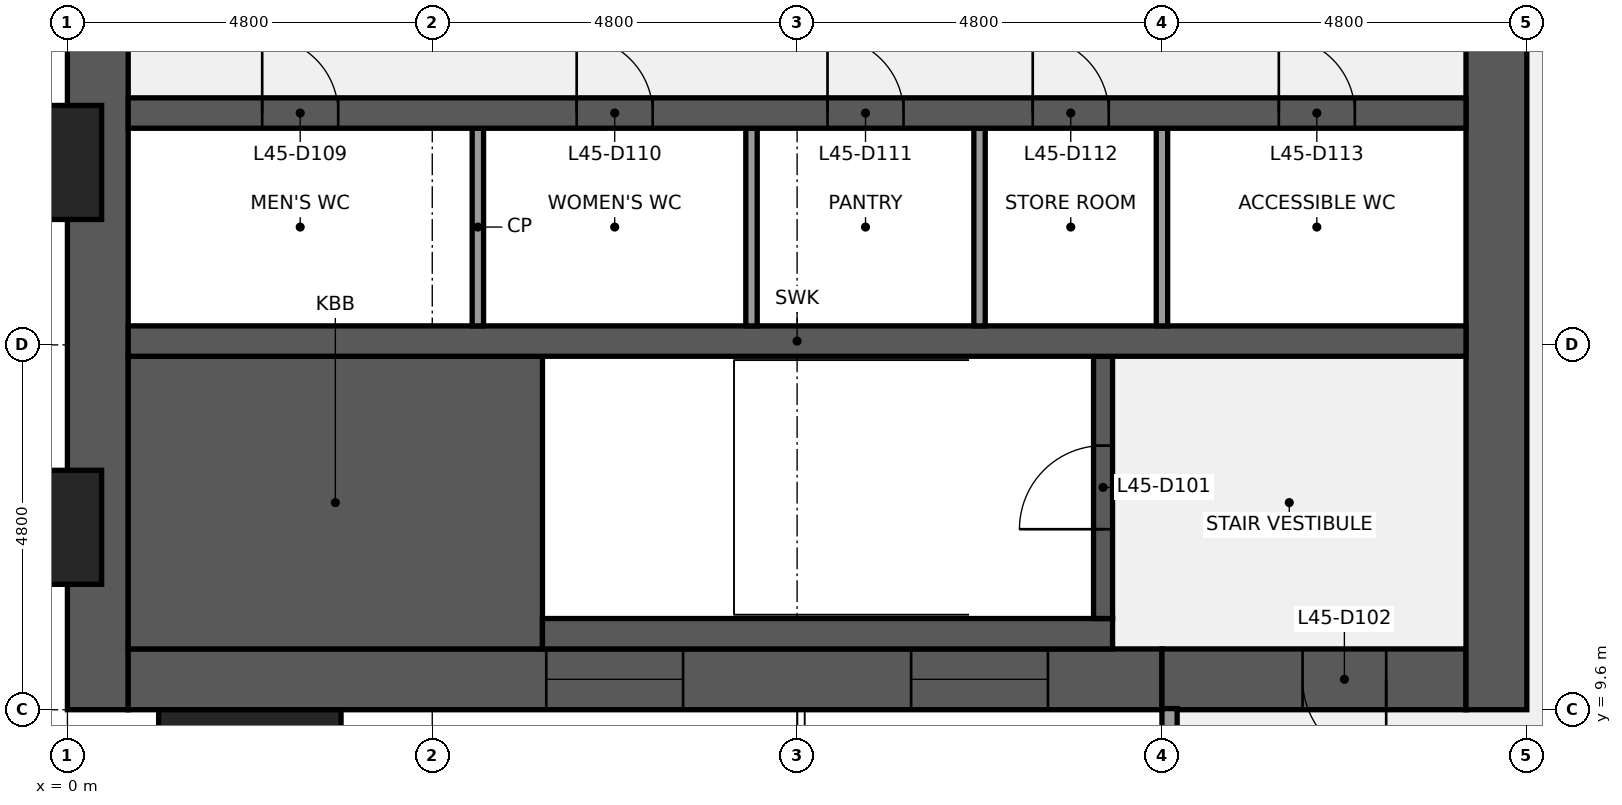
"""IFC4 building model, lengths in metres.
Left out: names, types, materials, properties, quantities, classifications, styles, units other than length and angle.
Written with IfcOpenShell. Run it as: python <this file> out.ifc"""

import sys

from ifc_helpers import new_model, si_unit, direction, frame, frame_2d, origin, origin_2d, place, context, subcontext, project, spatial, rectangle, extrude, element, fill, save


model = new_model("IFC4")
c1 = context("Model", 3, precision=1e-05, world=origin(), true_north=direction((0.0, 1.0)))
c2 = subcontext(c1, "Body", "Model", "MODEL_VIEW")
j1 = project(units=[si_unit("LENGTHUNIT", "METRE"), si_unit("PLANEANGLEUNIT", "RADIAN")], contexts=[c1])
p1 = place(None, origin())
s1 = spatial("IfcSite", under=j1, at=p1, CompositionType="ELEMENT")
p2 = place(p1, origin())
s2 = spatial("IfcBuilding", under=s1, at=p2, CompositionType="ELEMENT")
p3 = place(p2, frame((0.0, 0.0, 209.2)))
s3 = spatial("IfcBuildingStorey", under=s2, at=p3, CompositionType="ELEMENT", Elevation=209.2)
p4 = place(p3, frame((0.4, 9.6, 0.0), z_axis=(0.0, 0.0, 1.0), x_axis=(0.0, 1.0, 0.0)))
e1 = element("IfcWall", 1, at=p4, inside=s3, PredefinedType="SHEAR", context=c2, shape_type="SweptSolid", body=[
    extrude(rectangle(XDim=28.8, YDim=0.8, at=frame_2d((14.4, 0.0))), origin(), (0.0, 0.0, 1.0), 3.84),
])
p5 = place(p4, frame((8.85, 0.0, 0.9)))
e2 = element("IfcOpeningElement", 2, at=p5, cuts=e1, PredefinedType="OPENING", context=c2, shape_type="SweptSolid", body=[
    extrude(rectangle(XDim=1.5, YDim=1.5, at=frame_2d((0.75, 0.75))), frame((0.0, 0.41, 0.0), z_axis=(0.0, -1.0, 0.0), x_axis=(1.0, 0.0, 0.0)), (0.0, 0.0, 1.0), 0.82),
])
p6 = place(p4, frame((18.45, 0.0, 0.9)))
e3 = element("IfcOpeningElement", 3, at=p6, cuts=e1, PredefinedType="OPENING", context=c2, shape_type="SweptSolid", body=[
    extrude(rectangle(XDim=1.5, YDim=1.5, at=frame_2d((0.75, 0.75))), frame((0.0, 0.41, 0.0), z_axis=(0.0, -1.0, 0.0), x_axis=(1.0, 0.0, 0.0)), (0.0, 0.0, 1.0), 0.82),
])
p7 = place(p3, frame((14.4, 10.0, 0.0), z_axis=(0.0, 0.0, 1.0), x_axis=(-1.0, 0.0, 0.0)))
e4 = element("IfcWall", 4, at=p7, inside=s3, PredefinedType="SHEAR", context=c2, shape_type="SweptSolid", body=[
    extrude(rectangle(XDim=13.6, YDim=0.8, at=frame_2d((6.8, 0.0))), origin(), (0.0, 0.0, 1.0), 3.84),
])
p8 = place(p7, frame((6.3, 0.0, 0.9)))
e5 = element("IfcOpeningElement", 5, at=p8, cuts=e4, PredefinedType="OPENING", context=c2, shape_type="SweptSolid", body=[
    extrude(rectangle(XDim=1.8, YDim=1.5, at=frame_2d((0.9, 0.75))), frame((0.0, 0.41, 0.0), z_axis=(0.0, -1.0, 0.0), x_axis=(1.0, 0.0, 0.0)), (0.0, 0.0, 1.0), 0.82),
])
p9 = place(p7, frame((1.5, 0.0, 0.9)))
e6 = element("IfcOpeningElement", 6, at=p9, cuts=e4, PredefinedType="OPENING", context=c2, shape_type="SweptSolid", body=[
    extrude(rectangle(XDim=1.8, YDim=1.5, at=frame_2d((0.9, 0.75))), frame((0.0, 0.41, 0.0), z_axis=(0.0, -1.0, 0.0), x_axis=(1.0, 0.0, 0.0)), (0.0, 0.0, 1.0), 0.82),
])
p10 = place(p3, frame((18.4, 10.0, 0.0), z_axis=(0.0, 0.0, 1.0), x_axis=(-1.0, 0.0, 0.0)))
e7 = element("IfcWall", 7, at=p10, inside=s3, PredefinedType="SHEAR", context=c2, shape_type="SweptSolid", body=[
    extrude(rectangle(XDim=4.0, YDim=0.8, at=frame_2d((2.0, 0.0))), origin(), (0.0, 0.0, 1.0), 3.84),
])
p11 = place(p10, frame((1.05, 0.0, 0.0)))
e8 = element("IfcOpeningElement", 8, at=p11, cuts=e7, PredefinedType="OPENING", context=c2, shape_type="SweptSolid", body=[
    extrude(rectangle(XDim=1.1, YDim=2.1, at=frame_2d((0.55, 1.05))), frame((0.0, 0.41, 0.0), z_axis=(0.0, -1.0, 0.0), x_axis=(1.0, 0.0, 0.0)), (0.0, 0.0, 1.0), 0.82),
])
p12 = place(p3, frame((18.8, 38.4, 0.0), z_axis=(0.0, 0.0, 1.0), x_axis=(0.0, -1.0, 0.0)))
e9 = element("IfcWall", 9, at=p12, inside=s3, PredefinedType="SHEAR", context=c2, shape_type="SweptSolid", body=[
    extrude(rectangle(XDim=28.8, YDim=0.8, at=frame_2d((14.4, 0.0))), origin(), (0.0, 0.0, 1.0), 3.84),
])
p13 = place(p12, frame((18.3, 0.0, 0.0)))
e10 = element("IfcOpeningElement", 10, at=p13, cuts=e9, PredefinedType="OPENING", context=c2, shape_type="SweptSolid", body=[
    extrude(rectangle(XDim=1.8, YDim=2.1, at=frame_2d((0.9, 1.05))), frame((0.0, 0.41, 0.0), z_axis=(0.0, -1.0, 0.0), x_axis=(1.0, 0.0, 0.0)), (0.0, 0.0, 1.0), 0.82),
])
p14 = place(p12, frame((8.7, 0.0, 0.0)))
e11 = element("IfcOpeningElement", 11, at=p14, cuts=e9, PredefinedType="OPENING", context=c2, shape_type="SweptSolid", body=[
    extrude(rectangle(XDim=1.8, YDim=2.1, at=frame_2d((0.9, 1.05))), frame((0.0, 0.41, 0.0), z_axis=(0.0, -1.0, 0.0), x_axis=(1.0, 0.0, 0.0)), (0.0, 0.0, 1.0), 0.82),
])
p15 = place(p3, frame((0.8, 12.325, 0.0), z_axis=(0.0, 0.0, 1.0), x_axis=(1.0, 0.0, 0.0)))
e12 = element("IfcWall", 12, at=p15, inside=s3, PredefinedType="SHEAR", context=c2, shape_type="SweptSolid", body=[
    extrude(rectangle(XDim=5.45, YDim=3.85, at=frame_2d((2.725, 0.0))), origin(), (0.0, 0.0, 1.0), 3.84),
])
p16 = place(p3, frame((6.25, 10.6, 0.0), z_axis=(0.0, 0.0, 1.0), x_axis=(1.0, 0.0, 0.0)))
e13 = element("IfcWall", 13, at=p16, inside=s3, PredefinedType="SHEAR", context=c2, shape_type="SweptSolid", body=[
    extrude(rectangle(XDim=7.5, YDim=0.4, at=frame_2d((3.75, 0.0))), origin(), (0.0, 0.0, 1.0), 3.84),
])
p17 = place(p3, frame((13.625, 10.8, 0.0), z_axis=(0.0, 0.0, 1.0), x_axis=(0.0, 1.0, 0.0)))
e14 = element("IfcWall", 14, at=p17, inside=s3, PredefinedType="SHEAR", context=c2, shape_type="SweptSolid", body=[
    extrude(rectangle(XDim=3.45, YDim=0.25, at=frame_2d((1.725, 0.0))), origin(), (0.0, 0.0, 1.0), 3.84),
])
p18 = place(p17, frame((1.175, 0.0, 0.0)))
e15 = element("IfcOpeningElement", 15, at=p18, cuts=e14, PredefinedType="OPENING", context=c2, shape_type="SweptSolid", body=[
    extrude(rectangle(XDim=1.1, YDim=2.1, at=frame_2d((0.55, 1.05))), frame((0.0, 0.135, 0.0), z_axis=(0.0, -1.0, 0.0), x_axis=(1.0, 0.0, 0.0)), (0.0, 0.0, 1.0), 0.27),
])
p19 = place(p3, frame((0.8, 14.45, 0.0), z_axis=(0.0, 0.0, 1.0), x_axis=(1.0, 0.0, 0.0)))
e16 = element("IfcWall", 16, at=p19, inside=s3, PredefinedType="SHEAR", context=c2, shape_type="SweptSolid", body=[
    extrude(rectangle(XDim=17.6, YDim=0.4, at=frame_2d((8.8, 0.0))), origin(), (0.0, 0.0, 1.0), 3.84),
])
for number, where, z_axis, x_axis in (
    (17, (5.4, 14.65, 0.0), (0.0, 0.0, 1.0), (0.0, 1.0, 0.0)),
    (18, (9.0, 14.65, 0.0), (0.0, 0.0, 1.0), (0.0, 1.0, 0.0)),
    (19, (12.0, 14.65, 0.0), (0.0, 0.0, 1.0), (0.0, 1.0, 0.0)),
    (20, (14.4, 14.65, 0.0), (0.0, 0.0, 1.0), (0.0, 1.0, 0.0)),
):
    element("IfcWall", number, at=place(p3, frame(where, z_axis=z_axis, x_axis=x_axis)), inside=s3, PredefinedType="PARTITIONING", context=c2, shape_type="SweptSolid", body=[
        extrude(rectangle(XDim=2.6, YDim=0.15, at=frame_2d((1.3, 0.0))), origin(), (0.0, 0.0, 1.0), 3.84),
    ])
p20 = place(p3, frame((0.8, 17.45, 0.0), z_axis=(0.0, 0.0, 1.0), x_axis=(1.0, 0.0, 0.0)))
e21 = element("IfcWall", 21, at=p20, inside=s3, PredefinedType="SHEAR", context=c2, shape_type="SweptSolid", body=[
    extrude(rectangle(XDim=17.6, YDim=0.4, at=frame_2d((8.8, 0.0))), origin(), (0.0, 0.0, 1.0), 3.84),
])
p21 = place(p20, frame((1.762, 0.0, 0.0)))
e22 = element("IfcOpeningElement", 22, at=p21, cuts=e21, PredefinedType="OPENING", context=c2, shape_type="SweptSolid", body=[
    extrude(rectangle(XDim=1.0, YDim=2.1, at=frame_2d((0.5, 1.05))), frame((0.0, 0.21, 0.0), z_axis=(0.0, -1.0, 0.0), x_axis=(1.0, 0.0, 0.0)), (0.0, 0.0, 1.0), 0.42),
])
p22 = place(p20, frame((5.9, 0.0, 0.0)))
e23 = element("IfcOpeningElement", 23, at=p22, cuts=e21, PredefinedType="OPENING", context=c2, shape_type="SweptSolid", body=[
    extrude(rectangle(XDim=1.0, YDim=2.1, at=frame_2d((0.5, 1.05))), frame((0.0, 0.21, 0.0), z_axis=(0.0, -1.0, 0.0), x_axis=(1.0, 0.0, 0.0)), (0.0, 0.0, 1.0), 0.42),
])
p23 = place(p20, frame((9.2, 0.0, 0.0)))
e24 = element("IfcOpeningElement", 24, at=p23, cuts=e21, PredefinedType="OPENING", context=c2, shape_type="SweptSolid", body=[
    extrude(rectangle(XDim=1.0, YDim=2.1, at=frame_2d((0.5, 1.05))), frame((0.0, 0.21, 0.0), z_axis=(0.0, -1.0, 0.0), x_axis=(1.0, 0.0, 0.0)), (0.0, 0.0, 1.0), 0.42),
])
p24 = place(p20, frame((11.9, 0.0, 0.0)))
e25 = element("IfcOpeningElement", 25, at=p24, cuts=e21, PredefinedType="OPENING", context=c2, shape_type="SweptSolid", body=[
    extrude(rectangle(XDim=1.0, YDim=2.1, at=frame_2d((0.5, 1.05))), frame((0.0, 0.21, 0.0), z_axis=(0.0, -1.0, 0.0), x_axis=(1.0, 0.0, 0.0)), (0.0, 0.0, 1.0), 0.42),
])
p25 = place(p20, frame((15.137, 0.0, 0.0)))
e26 = element("IfcOpeningElement", 26, at=p25, cuts=e21, PredefinedType="OPENING", context=c2, shape_type="SweptSolid", body=[
    extrude(rectangle(XDim=1.0, YDim=2.1, at=frame_2d((0.5, 1.05))), frame((0.0, 0.21, 0.0), z_axis=(0.0, -1.0, 0.0), x_axis=(1.0, 0.0, 0.0)), (0.0, 0.0, 1.0), 0.42),
])
for number, where, z_axis, x_axis in (
    (27, (-0.75, 12.0, 0.0), (0.0, 0.0, 1.0), (0.0, 1.0, 0.0)),
    (28, (-0.75, 16.8, 0.0), (0.0, 0.0, 1.0), (0.0, 1.0, 0.0)),
    (29, (2.4, 8.85, 0.0), (0.0, 0.0, 1.0), (1.0, 0.0, 0.0)),
):
    element("IfcColumn", number, at=place(p3, frame(where, z_axis=z_axis, x_axis=x_axis)), inside=s3, PredefinedType="PILASTER", context=c2, shape_type="SweptSolid", body=[
        extrude(rectangle(XDim=2.4, YDim=1.5, at=origin_2d()), origin(), (0.0, 0.0, 1.0), 4.0),
    ])
p26 = place(p3, frame((14.5, 9.615, 0.0), z_axis=(0.0, 0.0, 1.0), x_axis=(0.0, -1.0, 0.0)))
e30 = element("IfcWall", 30, at=p26, inside=s3, PredefinedType="SOLIDWALL", context=c2, shape_type="SweptSolid", body=[
    extrude(rectangle(XDim=2.415, YDim=0.2, at=frame_2d((1.208, 0.0))), origin(), (0.0, 0.0, 1.0), 3.296),
])
p27 = place(p26, frame((0.5, 0.0, 0.0)))
e31 = element("IfcOpeningElement", 31, at=p27, cuts=e30, PredefinedType="OPENING", context=c2, shape_type="SweptSolid", body=[
    extrude(rectangle(XDim=1.8, YDim=2.1, at=frame_2d((0.9, 1.05))), frame((0.0, 0.11, 0.0), z_axis=(0.0, -1.0, 0.0), x_axis=(1.0, 0.0, 0.0)), (0.0, 0.0, 1.0), 0.22),
])
p28 = place(p18, origin())
e32 = element("IfcDoor", 32, at=p28, inside=s3, OperationType="SINGLE_SWING_LEFT", PredefinedType="DOOR", context=c2, shape_type="SweptSolid", body=[
    extrude(rectangle(XDim=1.1, YDim=2.1, at=frame_2d((0.55, 1.05))), frame((0.0, 0.025, 0.0), z_axis=(0.0, -1.0, 0.0), x_axis=(1.0, 0.0, 0.0)), (0.0, 0.0, 1.0), 0.05),
])
fill(e15, e32)
p29 = place(p11, origin())
e33 = element("IfcDoor", 33, at=p29, inside=s3, OperationType="SINGLE_SWING_LEFT", PredefinedType="DOOR", context=c2, shape_type="SweptSolid", body=[
    extrude(rectangle(XDim=1.1, YDim=2.1, at=frame_2d((0.55, 1.05))), frame((0.0, 0.025, 0.0), z_axis=(0.0, -1.0, 0.0), x_axis=(1.0, 0.0, 0.0)), (0.0, 0.0, 1.0), 0.05),
])
fill(e8, e33)
p30 = place(p21, origin())
e34 = element("IfcDoor", 34, at=p30, inside=s3, OperationType="SINGLE_SWING_LEFT", PredefinedType="DOOR", context=c2, shape_type="SweptSolid", body=[
    extrude(rectangle(XDim=1.0, YDim=2.1, at=frame_2d((0.5, 1.05))), frame((0.0, 0.025, 0.0), z_axis=(0.0, -1.0, 0.0), x_axis=(1.0, 0.0, 0.0)), (0.0, 0.0, 1.0), 0.05),
])
fill(e22, e34)
p31 = place(p22, origin())
e35 = element("IfcDoor", 35, at=p31, inside=s3, OperationType="SINGLE_SWING_LEFT", PredefinedType="DOOR", context=c2, shape_type="SweptSolid", body=[
    extrude(rectangle(XDim=1.0, YDim=2.1, at=frame_2d((0.5, 1.05))), frame((0.0, 0.025, 0.0), z_axis=(0.0, -1.0, 0.0), x_axis=(1.0, 0.0, 0.0)), (0.0, 0.0, 1.0), 0.05),
])
fill(e23, e35)
p32 = place(p23, origin())
e36 = element("IfcDoor", 36, at=p32, inside=s3, OperationType="SINGLE_SWING_LEFT", PredefinedType="DOOR", context=c2, shape_type="SweptSolid", body=[
    extrude(rectangle(XDim=1.0, YDim=2.1, at=frame_2d((0.5, 1.05))), frame((0.0, 0.025, 0.0), z_axis=(0.0, -1.0, 0.0), x_axis=(1.0, 0.0, 0.0)), (0.0, 0.0, 1.0), 0.05),
])
fill(e24, e36)
p33 = place(p24, origin())
e37 = element("IfcDoor", 37, at=p33, inside=s3, OperationType="SINGLE_SWING_LEFT", PredefinedType="DOOR", context=c2, shape_type="SweptSolid", body=[
    extrude(rectangle(XDim=1.0, YDim=2.1, at=frame_2d((0.5, 1.05))), frame((0.0, 0.025, 0.0), z_axis=(0.0, -1.0, 0.0), x_axis=(1.0, 0.0, 0.0)), (0.0, 0.0, 1.0), 0.05),
])
fill(e25, e37)
p34 = place(p25, origin())
e38 = element("IfcDoor", 38, at=p34, inside=s3, OperationType="SINGLE_SWING_LEFT", PredefinedType="DOOR", context=c2, shape_type="SweptSolid", body=[
    extrude(rectangle(XDim=1.0, YDim=2.1, at=frame_2d((0.5, 1.05))), frame((0.0, 0.025, 0.0), z_axis=(0.0, -1.0, 0.0), x_axis=(1.0, 0.0, 0.0)), (0.0, 0.0, 1.0), 0.05),
])
fill(e26, e38)
p35 = place(p8, origin())
e39 = element("IfcWindow", 39, at=p35, inside=s3, PartitioningType="SINGLE_PANEL", PredefinedType="WINDOW", context=c2, shape_type="SweptSolid", body=[
    extrude(rectangle(XDim=1.8, YDim=1.5, at=frame_2d((0.9, 0.75))), frame((0.0, 0.03, 0.0), z_axis=(0.0, -1.0, 0.0), x_axis=(1.0, 0.0, 0.0)), (0.0, 0.0, 1.0), 0.06),
])
fill(e5, e39)
p36 = place(p9, origin())
e40 = element("IfcWindow", 40, at=p36, inside=s3, PartitioningType="SINGLE_PANEL", PredefinedType="WINDOW", context=c2, shape_type="SweptSolid", body=[
    extrude(rectangle(XDim=1.8, YDim=1.5, at=frame_2d((0.9, 0.75))), frame((0.0, 0.03, 0.0), z_axis=(0.0, -1.0, 0.0), x_axis=(1.0, 0.0, 0.0)), (0.0, 0.0, 1.0), 0.06),
])
fill(e6, e40)
save(model, sys.argv[1])
